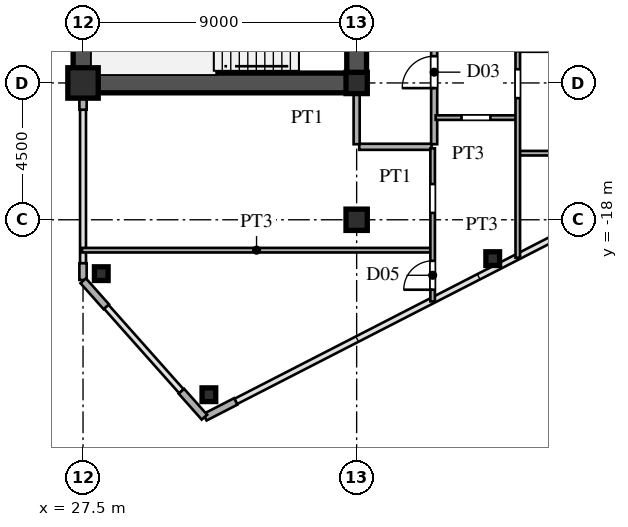
"""IFC4 building model, lengths in metres.
Left out: names, types, materials, properties, quantities, classifications, styles, units other than length and angle.
Written with IfcOpenShell. Run it as: python <this file> out.ifc"""

import sys

from ifc_helpers import new_model, si_unit, direction, frame, frame_2d, origin, origin_2d, place, context, subcontext, project, spatial, rectangle, hollow_rectangle, i_section, extrude, source, transform, mapped, element, fill, save


model = new_model("IFC4")
c1 = context("Model", 3, precision=1e-05, world=origin(), true_north=direction((0.0, 1.0)))
c2 = subcontext(c1, "Body", "Model", "MODEL_VIEW")
j1 = project(units=[si_unit("LENGTHUNIT", "METRE"), si_unit("PLANEANGLEUNIT", "RADIAN")], contexts=[c1])
p1 = place(None, origin())
s1 = spatial("IfcSite", under=j1, at=p1, CompositionType="ELEMENT")
p2 = place(p1, origin())
s2 = spatial("IfcBuilding", under=s1, at=p2, CompositionType="ELEMENT")
p3 = place(p2, frame((0.0, 0.0, 128.4)))
s3 = spatial("IfcBuildingStorey", under=s2, at=p3, CompositionType="ELEMENT", Elevation=128.4)
m1 = source(origin(), c2, "Body", "SweptSolid", [
    extrude(hollow_rectangle(XDim=1.0, YDim=1.0, WallThickness=0.042, at=origin_2d()), origin(), (0.0, 0.0, 1.0), 3.6),
])
p4 = place(p3, frame((27.5, -13.5, 0.0), z_axis=(0.0, 0.0, 1.0), x_axis=(1.0, 0.0, 0.0)))
e1 = element("IfcColumn", 1, at=p4, inside=s3, PredefinedType="COLUMN", context=c2, shape_type="MappedRepresentation", body=[
    mapped(m1, transform((0.0, 0.0, 0.0), scale=1.0)),
])
m2 = source(origin(), c2, "Body", "SweptSolid", [
    extrude(i_section(OverallWidth=0.7, OverallDepth=0.7, WebThickness=0.028, FlangeThickness=0.045, at=origin_2d()), origin(), (0.0, 0.0, 1.0), 3.6),
])
for number, where, z_axis, x_axis in (
    (2, (36.5, -18.0, 0.0), (0.0, 0.0, 1.0), (1.0, 0.0, 0.0)),
    (3, (36.5, -13.5, 0.0), (0.0, 0.0, 1.0), (1.0, 0.0, 0.0)),
):
    element("IfcColumn", number, at=place(p3, frame(where, z_axis=z_axis, x_axis=x_axis)), inside=s3, PredefinedType="COLUMN", context=c2, shape_type="MappedRepresentation", body=[
        mapped(m2, transform((0.0, 0.0, 0.0), scale=1.0)),
    ])
m3 = source(origin(), c2, "Body", "SweptSolid", [
    extrude(hollow_rectangle(XDim=0.45, YDim=0.45, WallThickness=0.018, at=origin_2d()), origin(), (0.0, 0.0, 1.0), 3.6),
])
for number, where, z_axis, x_axis in (
    (4, (31.64, -23.754, 0.0), (0.0, 0.0, 1.0), (1.0, 0.0, 0.0)),
    (5, (28.1, -19.772, 0.0), (0.0, 0.0, 1.0), (1.0, 0.0, 0.0)),
    (6, (40.976, -19.278, 0.0), (0.0, 0.0, 1.0), (1.0, 0.0, 0.0)),
):
    element("IfcColumn", number, at=place(p3, frame(where, z_axis=z_axis, x_axis=x_axis)), inside=s3, PredefinedType="COLUMN", context=c2, shape_type="MappedRepresentation", body=[
        mapped(m3, transform((0.0, 0.0, 0.0), scale=1.0)),
    ])
p5 = place(p3, frame((31.509, -24.495, 0.0), z_axis=(0.0, 0.0, 1.0), x_axis=(0.889797395748, 0.456355776255, 0.0)))
e7 = element("IfcWall", 7, at=p5, inside=s3, PredefinedType="SOLIDWALL", context=c2, shape_type="SweptSolid", body=[
    extrude(rectangle(XDim=1.14, YDim=0.24, at=frame_2d((0.57, 0.0))), origin(), (0.0, 0.0, 1.0), 3.38),
])
p6 = place(p3, frame((27.5, -19.98, 0.0), z_axis=(0.0, 0.0, 1.0), x_axis=(0.0, 1.0, 0.0)))
e8 = element("IfcWall", 8, at=p6, inside=s3, PredefinedType="SOLIDWALL", context=c2, shape_type="SweptSolid", body=[
    extrude(rectangle(XDim=0.55, YDim=0.24, at=frame_2d((0.275, 0.0))), origin(), (0.0, 0.0, 1.0), 3.38),
])
p7 = place(p3, frame((27.5, -14.38, 0.0), z_axis=(0.0, 0.0, 1.0), x_axis=(0.0, 1.0, 0.0)))
e9 = element("IfcWall", 9, at=p7, inside=s3, PredefinedType="SOLIDWALL", context=c2, shape_type="SweptSolid", body=[
    extrude(rectangle(XDim=0.55, YDim=0.24, at=frame_2d((0.275, 0.0))), origin(), (0.0, 0.0, 1.0), 2.88),
])
for number, where, z_axis, x_axis in (
    (10, (27.507, -20.008, 0.0), (0.0, 0.0, 1.0), (0.664, -0.747, 0.0)),
    (11, (30.736, -23.64, 0.0), (0.0, 0.0, 1.0), (0.664, -0.747, 0.0)),
):
    element("IfcWall", number, at=place(p3, frame(where, z_axis=z_axis, x_axis=x_axis)), inside=s3, PredefinedType="SOLIDWALL", context=c2, shape_type="SweptSolid", body=[
        extrude(rectangle(XDim=1.14, YDim=0.24, at=frame_2d((0.57, 0.0))), origin(), (0.0, 0.0, 1.0), 3.38),
    ])
p8 = place(p3, frame((27.5, -13.5, 0.0), z_axis=(0.0, 0.0, 1.0), x_axis=(0.0, 1.0, 0.0)))
e12 = element("IfcWall", 12, at=p8, inside=s3, PredefinedType="SHEAR", context=c2, shape_type="SweptSolid", body=[
    extrude(rectangle(XDim=12.2, YDim=0.65, at=frame_2d((6.1, 0.0))), origin(), (0.0, 0.0, 1.0), 3.38),
])
p9 = place(p3, frame((27.5, -13.5, 0.0), z_axis=(0.0, 0.0, 1.0), x_axis=(1.0, 0.0, 0.0)))
e13 = element("IfcWall", 13, at=p9, inside=s3, PredefinedType="SHEAR", context=c2, shape_type="SweptSolid", body=[
    extrude(rectangle(XDim=9.0, YDim=0.65, at=frame_2d((4.5, 0.0))), origin(), (0.0, 0.0, 1.0), 3.38),
])
p10 = place(p3, frame((36.5, -13.65, 0.0), z_axis=(0.0, 0.0, 1.0), x_axis=(0.0, 1.0, 0.0)))
e14 = element("IfcWall", 14, at=p10, inside=s3, PredefinedType="SHEAR", context=c2, shape_type="SweptSolid", body=[
    extrude(rectangle(XDim=7.15, YDim=0.65, at=frame_2d((3.575, 0.0))), origin(), (0.0, 0.0, 1.0), 3.38),
])
p11 = place(p10, frame((4.675, 0.0, 0.0)))
e15 = element("IfcOpeningElement", 15, at=p11, cuts=e14, PredefinedType="OPENING", context=c2, shape_type="SweptSolid", body=[
    extrude(rectangle(XDim=1.15, YDim=2.2, at=frame_2d((0.575, 1.1))), frame((0.0, 0.335, 0.0), z_axis=(0.0, -1.0, 0.0), x_axis=(1.0, 0.0, 0.0)), (0.0, 0.0, 1.0), 0.67),
])
p12 = place(p3, frame((27.465, -19.0, 0.0), z_axis=(0.0, 0.0, 1.0), x_axis=(1.0, 0.0, 0.0)))
e16 = element("IfcWall", 16, at=p12, inside=s3, PredefinedType="PARTITIONING", context=c2, shape_type="SweptSolid", body=[
    extrude(rectangle(XDim=11.485, YDim=0.15, at=frame_2d((5.742, 0.0))), origin(), (0.0, 0.0, 1.0), 3.38),
])
p13 = place(p3, frame((41.85, -15.81, 0.0), z_axis=(0.0, 0.0, 1.0), x_axis=(1.0, 0.0, 0.0)))
e17 = element("IfcWall", 17, at=p13, inside=s3, PredefinedType="PARTITIONING", context=c2, shape_type="SweptSolid", body=[
    extrude(rectangle(XDim=6.62, YDim=0.15, at=frame_2d((3.31, 0.0))), origin(), (0.0, 0.0, 1.0), 3.38),
])
p14 = place(p13, frame((2.792, 0.0, 0.0)))
e18 = element("IfcOpeningElement", 18, at=p14, cuts=e17, PredefinedType="OPENING", context=c2, shape_type="SweptSolid", body=[
    extrude(rectangle(XDim=0.95, YDim=2.15, at=frame_2d((0.475, 1.075))), frame((0.0, 0.085, 0.0), z_axis=(0.0, -1.0, 0.0), x_axis=(1.0, 0.0, 0.0)), (0.0, 0.0, 1.0), 0.17),
])
p15 = place(p3, frame((36.585, -15.6, 0.0), z_axis=(0.0, 0.0, 1.0), x_axis=(1.0, 0.0, 0.0)))
e19 = element("IfcWall", 19, at=p15, inside=s3, PredefinedType="PARTITIONING", context=c2, shape_type="SweptSolid", body=[
    extrude(rectangle(XDim=2.38, YDim=0.2, at=frame_2d((1.19, 0.0))), origin(), (0.0, 0.0, 1.0), 3.38),
])
p16 = place(p3, frame((39.1, -14.64, 0.0), z_axis=(0.0, 0.0, 1.0), x_axis=(1.0, 0.0, 0.0)))
e20 = element("IfcWall", 20, at=p16, inside=s3, PredefinedType="PARTITIONING", context=c2, shape_type="SweptSolid", body=[
    extrude(rectangle(XDim=2.65, YDim=0.15, at=frame_2d((1.325, 0.0))), origin(), (0.0, 0.0, 1.0), 3.38),
])
p17 = place(p16, frame((0.85, 0.0, 0.0)))
e21 = element("IfcOpeningElement", 21, at=p17, cuts=e20, PredefinedType="OPENING", context=c2, shape_type="SweptSolid", body=[
    extrude(rectangle(XDim=0.95, YDim=2.15, at=frame_2d((0.475, 1.075))), frame((0.0, 0.085, 0.0), z_axis=(0.0, -1.0, 0.0), x_axis=(1.0, 0.0, 0.0)), (0.0, 0.0, 1.0), 0.17),
])
p18 = place(p3, frame((36.5, -15.515, 0.0), z_axis=(0.0, 0.0, 1.0), x_axis=(0.0, 1.0, 0.0)))
e22 = element("IfcWall", 22, at=p18, inside=s3, PredefinedType="PARTITIONING", context=c2, shape_type="SweptSolid", body=[
    extrude(rectangle(XDim=1.685, YDim=0.2, at=frame_2d((0.842, 0.0))), origin(), (0.0, 0.0, 1.0), 2.78),
])
p19 = place(p3, frame((39.0, -20.686, 0.0), z_axis=(0.0, 0.0, 1.0), x_axis=(0.0, 1.0, 0.0)))
e23 = element("IfcWall", 23, at=p19, inside=s3, PredefinedType="PARTITIONING", context=c2, shape_type="SweptSolid", body=[
    extrude(rectangle(XDim=5.036, YDim=0.15, at=frame_2d((2.518, 0.0))), origin(), (0.0, 0.0, 1.0), 3.38),
])
p20 = place(p19, frame((0.385, 0.0, 0.0)))
e24 = element("IfcOpeningElement", 24, at=p20, cuts=e23, PredefinedType="OPENING", context=c2, shape_type="SweptSolid", body=[
    extrude(rectangle(XDim=0.95, YDim=2.15, at=frame_2d((0.475, 1.075))), frame((0.0, 0.085, 0.0), z_axis=(0.0, -1.0, 0.0), x_axis=(1.0, 0.0, 0.0)), (0.0, 0.0, 1.0), 0.17),
])
p21 = place(p19, frame((2.911, 0.0, 0.0)))
e25 = element("IfcOpeningElement", 25, at=p21, cuts=e23, PredefinedType="OPENING", context=c2, shape_type="SweptSolid", body=[
    extrude(rectangle(XDim=0.95, YDim=2.15, at=frame_2d((0.475, 1.075))), frame((0.0, 0.085, 0.0), z_axis=(0.0, -1.0, 0.0), x_axis=(1.0, 0.0, 0.0)), (0.0, 0.0, 1.0), 0.17),
])
p22 = place(p3, frame((39.05, -15.515, 0.0), z_axis=(0.0, 0.0, 1.0), x_axis=(0.0, 1.0, 0.0)))
e26 = element("IfcWall", 26, at=p22, inside=s3, PredefinedType="PARTITIONING", context=c2, shape_type="SweptSolid", body=[
    extrude(rectangle(XDim=31.03, YDim=0.2, at=frame_2d((15.515, 0.0))), origin(), (0.0, 0.0, 1.0), 3.38),
])
p23 = place(p22, frame((1.845, 0.0, 0.0)))
e27 = element("IfcOpeningElement", 27, at=p23, cuts=e26, PredefinedType="OPENING", context=c2, shape_type="SweptSolid", body=[
    extrude(rectangle(XDim=1.05, YDim=2.25, at=frame_2d((0.525, 1.125))), frame((0.0, 0.11, 0.0), z_axis=(0.0, -1.0, 0.0), x_axis=(1.0, 0.0, 0.0)), (0.0, 0.0, 1.0), 0.22),
])
p24 = place(p22, frame((12.78, 0.0, 0.0)))
e28 = element("IfcOpeningElement", 28, at=p24, cuts=e26, PredefinedType="OPENING", context=c2, shape_type="SweptSolid", body=[
    extrude(rectangle(XDim=1.05, YDim=2.25, at=frame_2d((0.525, 1.125))), frame((0.0, 0.11, 0.0), z_axis=(0.0, -1.0, 0.0), x_axis=(1.0, 0.0, 0.0)), (0.0, 0.0, 1.0), 0.22),
])
p25 = place(p22, frame((25.29, 0.0, 0.0)))
e29 = element("IfcOpeningElement", 29, at=p25, cuts=e26, PredefinedType="OPENING", context=c2, shape_type="SweptSolid", body=[
    extrude(rectangle(XDim=1.05, YDim=2.25, at=frame_2d((0.525, 1.125))), frame((0.0, 0.11, 0.0), z_axis=(0.0, -1.0, 0.0), x_axis=(1.0, 0.0, 0.0)), (0.0, 0.0, 1.0), 0.22),
])
p26 = place(p3, frame((41.8, -19.25, 0.0), z_axis=(0.0, 0.0, 1.0), x_axis=(0.0, 1.0, 0.0)))
e30 = element("IfcWall", 30, at=p26, inside=s3, PredefinedType="PARTITIONING", context=c2, shape_type="SweptSolid", body=[
    extrude(rectangle(XDim=6.795, YDim=0.15, at=frame_2d((3.397, 0.0))), origin(), (0.0, 0.0, 1.0), 3.38),
])
p27 = place(p26, frame((5.25, 0.0, 0.0)))
e31 = element("IfcOpeningElement", 31, at=p27, cuts=e30, PredefinedType="OPENING", context=c2, shape_type="SweptSolid", body=[
    extrude(rectangle(XDim=0.95, YDim=2.15, at=frame_2d((0.475, 1.075))), frame((0.0, 0.085, 0.0), z_axis=(0.0, -1.0, 0.0), x_axis=(1.0, 0.0, 0.0)), (0.0, 0.0, 1.0), 0.17),
])
m4 = source(origin(), c2, "Body", "SweptSolid", [
    extrude(rectangle(XDim=0.95, YDim=2.15, at=frame_2d((0.475, 1.075))), frame((0.0, 0.025, 0.0), z_axis=(0.0, -1.0, 0.0), x_axis=(1.0, 0.0, 0.0)), (0.0, 0.0, 1.0), 0.05),
])
p28 = place(p20, origin())
e32 = element("IfcDoor", 32, at=p28, inside=s3, OperationType="SINGLE_SWING_LEFT", PredefinedType="DOOR", context=c2, shape_type="MappedRepresentation", body=[
    mapped(m4, transform((0.0, 0.0, 0.0), scale=1.0)),
])
fill(e24, e32)
m5 = source(origin(), c2, "Body", "SweptSolid", [
    extrude(rectangle(XDim=1.05, YDim=2.25, at=frame_2d((0.525, 1.125))), frame((0.0, 0.025, 0.0), z_axis=(0.0, -1.0, 0.0), x_axis=(1.0, 0.0, 0.0)), (0.0, 0.0, 1.0), 0.05),
])
p29 = place(p23, origin())
e33 = element("IfcDoor", 33, at=p29, inside=s3, OperationType="SINGLE_SWING_LEFT", PredefinedType="DOOR", context=c2, shape_type="MappedRepresentation", body=[
    mapped(m5, transform((0.0, 0.0, 0.0), scale=1.0)),
])
fill(e27, e33)
save(model, sys.argv[1])
